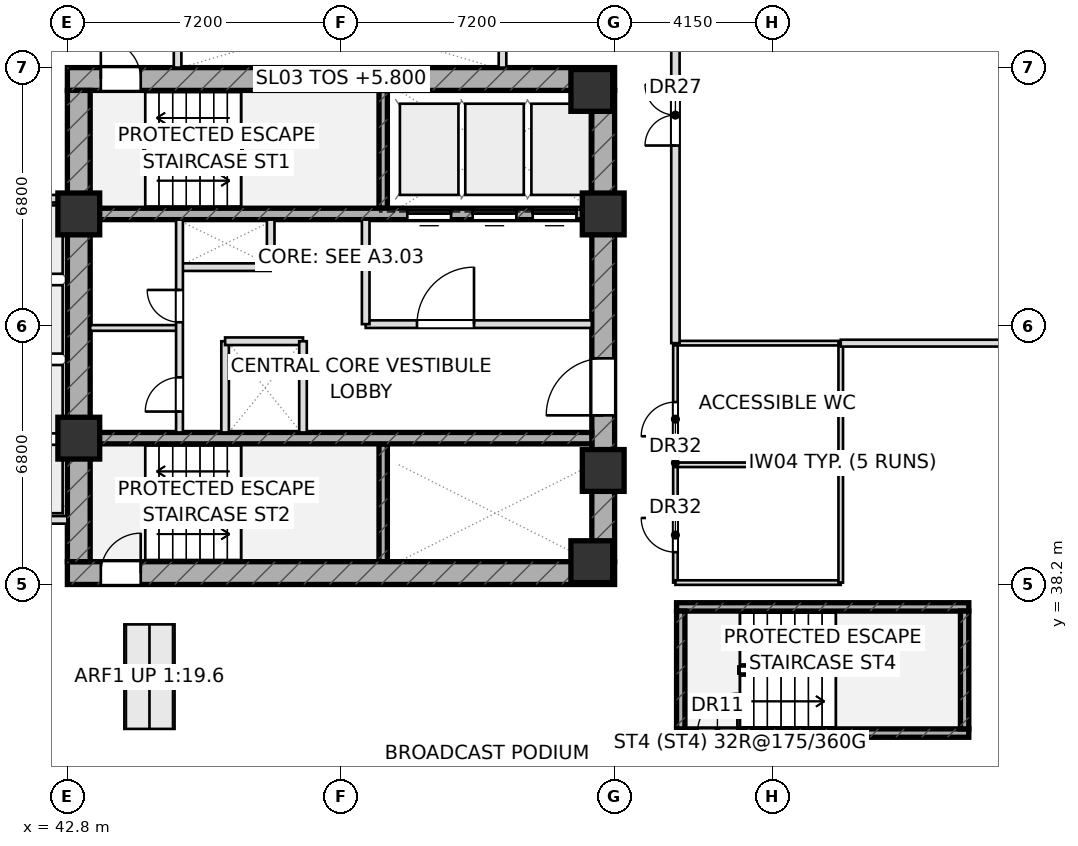
"""IFC4 building model, lengths in metres.
Left out: names, types, materials, properties, quantities, classifications, styles, units other than length and angle.
Written with IfcOpenShell. Run it as: python <this file> out.ifc"""

import sys

from ifc_helpers import new_model, si_unit, direction, frame, frame_2d, origin, origin_2d, place, context, subcontext, project, spatial, rectangle, extrude, element, fill, save


model = new_model("IFC4")
c1 = context("Model", 3, precision=1e-05, world=origin(), true_north=direction((0.0, 1.0)))
c2 = subcontext(c1, "Body", "Model", "MODEL_VIEW")
j1 = project(units=[si_unit("LENGTHUNIT", "METRE"), si_unit("PLANEANGLEUNIT", "RADIAN")], contexts=[c1])
p1 = place(None, origin())
s1 = spatial("IfcSite", under=j1, at=p1, CompositionType="ELEMENT")
p2 = place(p1, origin())
s2 = spatial("IfcBuilding", under=s1, at=p2, CompositionType="ELEMENT")
p3 = place(p2, frame((0.0, 0.0, 5.8)))
s3 = spatial("IfcBuildingStorey", under=s2, at=p3, CompositionType="ELEMENT", Elevation=5.8)
for number, where, z_axis, x_axis in (
    (1, (51.11, 48.1, 0.0), (0.0, 0.0, 1.0), (0.0, 1.0, 0.0)),
    (2, (51.11, 38.8, 0.0), (0.0, 0.0, 1.0), (0.0, 1.0, 0.0)),
):
    element("IfcWall", number, at=place(p3, frame(where, z_axis=z_axis, x_axis=x_axis)), inside=s3, PredefinedType="SHEAR", context=c2, shape_type="SweptSolid", body=[
        extrude(rectangle(XDim=3.1, YDim=0.22, at=frame_2d((1.55, 0.0))), origin(), (0.0, 0.0, 1.0), 5.25),
    ])
p4 = place(p3, frame((58.83, 34.29, 0.0), z_axis=(0.0, 0.0, 1.0), x_axis=(1.0, 0.0, 0.0)))
e3 = element("IfcWall", 3, at=p4, inside=s3, PredefinedType="SHEAR", context=c2, shape_type="SweptSolid", body=[
    extrude(rectangle(XDim=7.69, YDim=0.22, at=frame_2d((3.845, 0.0))), origin(), (0.0, 0.0, 1.0), 5.25),
])
p5 = place(p4, frame((0.55, 0.0, 0.0)))
e4 = element("IfcOpeningElement", 4, at=p5, cuts=e3, PredefinedType="OPENING", context=c2, shape_type="SweptSolid", body=[
    extrude(rectangle(XDim=1.05, YDim=2.2, at=frame_2d((0.525, 1.1))), frame((0.0, 0.12, 0.0), z_axis=(0.0, -1.0, 0.0), x_axis=(1.0, 0.0, 0.0)), (0.0, 0.0, 1.0), 0.24),
])
p6 = place(p3, frame((58.83, 37.61, 0.0), z_axis=(0.0, 0.0, 1.0), x_axis=(1.0, 0.0, 0.0)))
e5 = element("IfcWall", 5, at=p6, inside=s3, PredefinedType="SHEAR", context=c2, shape_type="SweptSolid", body=[
    extrude(rectangle(XDim=7.69, YDim=0.22, at=frame_2d((3.845, 0.0))), origin(), (0.0, 0.0, 1.0), 5.25),
])
for number, where, z_axis, x_axis in (
    (6, (66.41, 34.4, 0.0), (0.0, 0.0, 1.0), (0.0, 1.0, 0.0)),
    (7, (58.94, 34.4, 0.0), (0.0, 0.0, 1.0), (0.0, 1.0, 0.0)),
):
    element("IfcWall", number, at=place(p3, frame(where, z_axis=z_axis, x_axis=x_axis)), inside=s3, PredefinedType="SHEAR", context=c2, shape_type="SweptSolid", body=[
        extrude(rectangle(XDim=3.1, YDim=0.22, at=frame_2d((1.55, 0.0))), origin(), (0.0, 0.0, 1.0), 5.25),
    ])
p7 = place(p3, frame((42.8, 51.5, 0.0), z_axis=(0.0, 0.0, 1.0), x_axis=(1.0, 0.0, 0.0)))
e8 = element("IfcWall", 8, at=p7, inside=s3, PredefinedType="SHEAR", context=c2, shape_type="SweptSolid", body=[
    extrude(rectangle(XDim=14.4, YDim=0.6, at=frame_2d((7.2, 0.0))), origin(), (0.0, 0.0, 1.0), 5.25),
])
p8 = place(p7, frame((0.88, 0.0, 0.0)))
e9 = element("IfcOpeningElement", 9, at=p8, cuts=e8, PredefinedType="OPENING", context=c2, shape_type="SweptSolid", body=[
    extrude(rectangle(XDim=1.05, YDim=2.2, at=frame_2d((0.525, 1.1))), frame((0.0, 0.31, 0.0), z_axis=(0.0, -1.0, 0.0), x_axis=(1.0, 0.0, 0.0)), (0.0, 0.0, 1.0), 0.62),
])
p9 = place(p3, frame((42.8, 38.5, 0.0), z_axis=(0.0, 0.0, 1.0), x_axis=(1.0, 0.0, 0.0)))
e10 = element("IfcWall", 10, at=p9, inside=s3, PredefinedType="SHEAR", context=c2, shape_type="SweptSolid", body=[
    extrude(rectangle(XDim=14.4, YDim=0.6, at=frame_2d((7.2, 0.0))), origin(), (0.0, 0.0, 1.0), 5.25),
])
p10 = place(p9, frame((0.88, 0.0, 0.0)))
e11 = element("IfcOpeningElement", 11, at=p10, cuts=e10, PredefinedType="OPENING", context=c2, shape_type="SweptSolid", body=[
    extrude(rectangle(XDim=1.05, YDim=2.2, at=frame_2d((0.525, 1.1))), frame((0.0, 0.31, 0.0), z_axis=(0.0, -1.0, 0.0), x_axis=(1.0, 0.0, 0.0)), (0.0, 0.0, 1.0), 0.62),
])
p11 = place(p3, frame((43.1, 38.8, 0.0), z_axis=(0.0, 0.0, 1.0), x_axis=(0.0, 1.0, 0.0)))
e12 = element("IfcWall", 12, at=p11, inside=s3, PredefinedType="SHEAR", context=c2, shape_type="SweptSolid", body=[
    extrude(rectangle(XDim=12.4, YDim=0.6, at=frame_2d((6.2, 0.0))), origin(), (0.0, 0.0, 1.0), 5.25),
])
p12 = place(p3, frame((56.9, 38.8, 0.0), z_axis=(0.0, 0.0, 1.0), x_axis=(0.0, 1.0, 0.0)))
e13 = element("IfcWall", 13, at=p12, inside=s3, PredefinedType="SHEAR", context=c2, shape_type="SweptSolid", body=[
    extrude(rectangle(XDim=12.4, YDim=0.6, at=frame_2d((6.2, 0.0))), origin(), (0.0, 0.0, 1.0), 5.25),
])
p13 = place(p12, frame((3.85, 0.0, 0.0)))
e14 = element("IfcOpeningElement", 14, at=p13, cuts=e13, PredefinedType="OPENING", context=c2, shape_type="SweptSolid", body=[
    extrude(rectangle(XDim=1.5, YDim=2.2, at=frame_2d((0.75, 1.1))), frame((0.0, 0.31, 0.0), z_axis=(0.0, -1.0, 0.0), x_axis=(1.0, 0.0, 0.0)), (0.0, 0.0, 1.0), 0.62),
])
p14 = place(p3, frame((43.4, 47.95, 0.0), z_axis=(0.0, 0.0, 1.0), x_axis=(1.0, 0.0, 0.0)))
e15 = element("IfcWall", 15, at=p14, inside=s3, PredefinedType="SHEAR", context=c2, shape_type="SweptSolid", body=[
    extrude(rectangle(XDim=13.2, YDim=0.3, at=frame_2d((6.6, 0.0))), origin(), (0.0, 0.0, 1.0), 5.25),
])
p15 = place(p14, frame((8.345, 0.0, 0.0)))
e16 = element("IfcOpeningElement", 16, at=p15, cuts=e15, PredefinedType="OPENING", context=c2, shape_type="SweptSolid", body=[
    extrude(rectangle(XDim=1.15, YDim=2.2, at=frame_2d((0.575, 1.1))), frame((0.0, 0.16, 0.0), z_axis=(0.0, -1.0, 0.0), x_axis=(1.0, 0.0, 0.0)), (0.0, 0.0, 1.0), 0.32),
])
p16 = place(p14, frame((10.065, 0.0, 0.0)))
e17 = element("IfcOpeningElement", 17, at=p16, cuts=e15, PredefinedType="OPENING", context=c2, shape_type="SweptSolid", body=[
    extrude(rectangle(XDim=1.15, YDim=2.2, at=frame_2d((0.575, 1.1))), frame((0.0, 0.16, 0.0), z_axis=(0.0, -1.0, 0.0), x_axis=(1.0, 0.0, 0.0)), (0.0, 0.0, 1.0), 0.32),
])
p17 = place(p14, frame((11.645, 0.0, 0.0)))
e18 = element("IfcOpeningElement", 18, at=p17, cuts=e15, PredefinedType="OPENING", context=c2, shape_type="SweptSolid", body=[
    extrude(rectangle(XDim=1.15, YDim=2.2, at=frame_2d((0.575, 1.1))), frame((0.0, 0.16, 0.0), z_axis=(0.0, -1.0, 0.0), x_axis=(1.0, 0.0, 0.0)), (0.0, 0.0, 1.0), 0.32),
])
p18 = place(p3, frame((43.4, 42.05, 0.0), z_axis=(0.0, 0.0, 1.0), x_axis=(1.0, 0.0, 0.0)))
e19 = element("IfcWall", 19, at=p18, inside=s3, PredefinedType="SHEAR", context=c2, shape_type="SweptSolid", body=[
    extrude(rectangle(XDim=13.2, YDim=0.3, at=frame_2d((6.6, 0.0))), origin(), (0.0, 0.0, 1.0), 5.25),
])
for number, where, z_axis, x_axis in (
    (20, (43.1, 47.95, 0.0), (0.0, 0.0, 1.0), (1.0, 0.0, 0.0)),
    (21, (56.9, 47.95, 0.0), (0.0, 0.0, 1.0), (1.0, 0.0, 0.0)),
    (22, (56.6, 51.2, 0.0), (0.0, 0.0, 1.0), (1.0, 0.0, 0.0)),
    (23, (43.1, 42.05, 0.0), (0.0, 0.0, 1.0), (1.0, 0.0, 0.0)),
    (24, (56.9, 41.2, 0.0), (0.0, 0.0, 1.0), (1.0, 0.0, 0.0)),
    (25, (56.6, 38.8, 0.0), (0.0, 0.0, 1.0), (1.0, 0.0, 0.0)),
):
    element("IfcColumn", number, at=place(p3, frame(where, z_axis=z_axis, x_axis=x_axis)), inside=s3, PredefinedType="COLUMN", context=c2, shape_type="SweptSolid", body=[
        extrude(rectangle(XDim=1.1, YDim=1.1, at=origin_2d()), origin(), (0.0, 0.0, 1.0), 5.25),
    ])
for number, where, z_axis, x_axis in (
    (26, (40.3, 39.9, 0.0), (0.0, 0.0, 1.0), (1.0, 0.0, 0.0)),
    (27, (40.3, 48.35, 0.0), (0.0, 0.0, 1.0), (1.0, 0.0, 0.0)),
    (28, (45.7, 51.8, 0.0), (0.0, 0.0, 1.0), (0.0, 1.0, 0.0)),
    (29, (54.25, 51.8, 0.0), (0.0, 0.0, 1.0), (0.0, 1.0, 0.0)),
):
    element("IfcWall", number, at=place(p3, frame(where, z_axis=z_axis, x_axis=x_axis)), inside=s3, PredefinedType="PARTITIONING", context=c2, shape_type="SweptSolid", body=[
        extrude(rectangle(XDim=2.5, YDim=0.2, at=frame_2d((1.25, 0.0))), origin(), (0.0, 0.0, 1.0), 5.25),
    ])
p19 = place(p3, frame((45.75, 46.55, 0.0), z_axis=(0.0, 0.0, 1.0), x_axis=(1.0, 0.0, 0.0)))
e30 = element("IfcWall", 30, at=p19, inside=s3, PredefinedType="PARTITIONING", context=c2, shape_type="SweptSolid", body=[
    extrude(rectangle(XDim=2.4, YDim=0.2, at=frame_2d((1.2, 0.0))), origin(), (0.0, 0.0, 1.0), 5.25),
])
p20 = place(p3, frame((48.15, 46.55, 0.0), z_axis=(0.0, 0.0, 1.0), x_axis=(0.0, 1.0, 0.0)))
e31 = element("IfcWall", 31, at=p20, inside=s3, PredefinedType="PARTITIONING", context=c2, shape_type="SweptSolid", body=[
    extrude(rectangle(XDim=1.25, YDim=0.2, at=frame_2d((0.625, 0.0))), origin(), (0.0, 0.0, 1.0), 5.25),
])
p21 = place(p3, frame((46.95, 42.2, 0.0), z_axis=(0.0, 0.0, 1.0), x_axis=(0.0, 1.0, 0.0)))
e32 = element("IfcWall", 32, at=p21, inside=s3, PredefinedType="PARTITIONING", context=c2, shape_type="SweptSolid", body=[
    extrude(rectangle(XDim=2.4, YDim=0.2, at=frame_2d((1.2, 0.0))), origin(), (0.0, 0.0, 1.0), 5.25),
])
p22 = place(p3, frame((46.95, 44.6, 0.0), z_axis=(0.0, 0.0, 1.0), x_axis=(1.0, 0.0, 0.0)))
e33 = element("IfcWall", 33, at=p22, inside=s3, PredefinedType="PARTITIONING", context=c2, shape_type="SweptSolid", body=[
    extrude(rectangle(XDim=2.05, YDim=0.2, at=frame_2d((1.025, 0.0))), origin(), (0.0, 0.0, 1.0), 5.25),
])
p23 = place(p3, frame((50.65, 45.05, 0.0), z_axis=(0.0, 0.0, 1.0), x_axis=(1.0, 0.0, 0.0)))
e34 = element("IfcWall", 34, at=p23, inside=s3, PredefinedType="PARTITIONING", context=c2, shape_type="SweptSolid", body=[
    extrude(rectangle(XDim=5.95, YDim=0.2, at=frame_2d((2.975, 0.0))), origin(), (0.0, 0.0, 1.0), 5.25),
])
p24 = place(p23, frame((1.35, 0.0, 0.0)))
e35 = element("IfcOpeningElement", 35, at=p24, cuts=e34, PredefinedType="OPENING", context=c2, shape_type="SweptSolid", body=[
    extrude(rectangle(XDim=1.5, YDim=2.2, at=frame_2d((0.75, 1.1))), frame((0.0, 0.11, 0.0), z_axis=(0.0, -1.0, 0.0), x_axis=(1.0, 0.0, 0.0)), (0.0, 0.0, 1.0), 0.22),
])
p25 = place(p3, frame((50.65, 45.05, 0.0), z_axis=(0.0, 0.0, 1.0), x_axis=(0.0, 1.0, 0.0)))
e36 = element("IfcWall", 36, at=p25, inside=s3, PredefinedType="PARTITIONING", context=c2, shape_type="SweptSolid", body=[
    extrude(rectangle(XDim=2.75, YDim=0.2, at=frame_2d((1.375, 0.0))), origin(), (0.0, 0.0, 1.0), 5.25),
])
p26 = place(p3, frame((43.4, 44.95, 0.0), z_axis=(0.0, 0.0, 1.0), x_axis=(1.0, 0.0, 0.0)))
e37 = element("IfcWall", 37, at=p26, inside=s3, PredefinedType="PARTITIONING", context=c2, shape_type="SweptSolid", body=[
    extrude(rectangle(XDim=2.35, YDim=0.15, at=frame_2d((1.175, 0.0))), origin(), (0.0, 0.0, 1.0), 5.25),
])
p27 = place(p3, frame((45.75, 42.2, 0.0), z_axis=(0.0, 0.0, 1.0), x_axis=(0.0, 1.0, 0.0)))
e38 = element("IfcWall", 38, at=p27, inside=s3, PredefinedType="PARTITIONING", context=c2, shape_type="SweptSolid", body=[
    extrude(rectangle(XDim=5.6, YDim=0.18, at=frame_2d((2.8, 0.0))), origin(), (0.0, 0.0, 1.0), 5.25),
])
p28 = place(p27, frame((0.55, 0.0, 0.0)))
e39 = element("IfcOpeningElement", 39, at=p28, cuts=e38, PredefinedType="OPENING", context=c2, shape_type="SweptSolid", body=[
    extrude(rectangle(XDim=0.9, YDim=2.05, at=frame_2d((0.45, 1.025))), frame((0.0, 0.1, 0.0), z_axis=(0.0, -1.0, 0.0), x_axis=(1.0, 0.0, 0.0)), (0.0, 0.0, 1.0), 0.2),
])
p29 = place(p27, frame((2.9, 0.0, 0.0)))
e40 = element("IfcOpeningElement", 40, at=p29, cuts=e38, PredefinedType="OPENING", context=c2, shape_type="SweptSolid", body=[
    extrude(rectangle(XDim=0.85, YDim=2.05, at=frame_2d((0.425, 1.025))), frame((0.0, 0.1, 0.0), z_axis=(0.0, -1.0, 0.0), x_axis=(1.0, 0.0, 0.0)), (0.0, 0.0, 1.0), 0.2),
])
p30 = place(p3, frame((58.8, 38.25, 0.0), z_axis=(0.0, 0.0, 1.0), x_axis=(0.0, 1.0, 0.0)))
e41 = element("IfcWall", 41, at=p30, inside=s3, PredefinedType="PARTITIONING", context=c2, shape_type="SweptSolid", body=[
    extrude(rectangle(XDim=6.3, YDim=0.12, at=frame_2d((3.15, 0.0))), origin(), (0.0, 0.0, 1.0), 5.25),
])
p31 = place(p30, frame((0.8, 0.0, 0.0)))
e42 = element("IfcOpeningElement", 42, at=p31, cuts=e41, PredefinedType="OPENING", context=c2, shape_type="SweptSolid", body=[
    extrude(rectangle(XDim=0.9, YDim=2.05, at=frame_2d((0.45, 1.025))), frame((0.0, 0.07, 0.0), z_axis=(0.0, -1.0, 0.0), x_axis=(1.0, 0.0, 0.0)), (0.0, 0.0, 1.0), 0.14),
])
p32 = place(p30, frame((3.85, 0.0, 0.0)))
e43 = element("IfcOpeningElement", 43, at=p32, cuts=e41, PredefinedType="OPENING", context=c2, shape_type="SweptSolid", body=[
    extrude(rectangle(XDim=0.9, YDim=2.05, at=frame_2d((0.45, 1.025))), frame((0.0, 0.07, 0.0), z_axis=(0.0, -1.0, 0.0), x_axis=(1.0, 0.0, 0.0)), (0.0, 0.0, 1.0), 0.14),
])
for number, where, z_axis, x_axis in (
    (44, (58.8, 38.25, 0.0), (0.0, 0.0, 1.0), (1.0, 0.0, 0.0)),
    (45, (58.8, 41.35, 0.0), (0.0, 0.0, 1.0), (1.0, 0.0, 0.0)),
    (46, (58.8, 44.55, 0.0), (0.0, 0.0, 1.0), (1.0, 0.0, 0.0)),
):
    element("IfcWall", number, at=place(p3, frame(where, z_axis=z_axis, x_axis=x_axis)), inside=s3, PredefinedType="PARTITIONING", context=c2, shape_type="SweptSolid", body=[
        extrude(rectangle(XDim=4.35, YDim=0.12, at=frame_2d((2.175, 0.0))), origin(), (0.0, 0.0, 1.0), 5.25),
    ])
p33 = place(p3, frame((63.15, 38.25, 0.0), z_axis=(0.0, 0.0, 1.0), x_axis=(0.0, 1.0, 0.0)))
e47 = element("IfcWall", 47, at=p33, inside=s3, PredefinedType="PARTITIONING", context=c2, shape_type="SweptSolid", body=[
    extrude(rectangle(XDim=6.3, YDim=0.12, at=frame_2d((3.15, 0.0))), origin(), (0.0, 0.0, 1.0), 5.25),
])
p34 = place(p3, frame((58.8, 44.55, 0.0), z_axis=(0.0, 0.0, 1.0), x_axis=(0.0, 1.0, 0.0)))
e48 = element("IfcWall", 48, at=p34, inside=s3, PredefinedType="PARTITIONING", context=c2, shape_type="SweptSolid", body=[
    extrude(rectangle(XDim=11.55, YDim=0.22, at=frame_2d((5.775, 0.0))), origin(), (0.0, 0.0, 1.0), 4.325),
])
p35 = place(p34, frame((5.2, 0.0, 0.0)))
e49 = element("IfcOpeningElement", 49, at=p35, cuts=e48, PredefinedType="OPENING", context=c2, shape_type="SweptSolid", body=[
    extrude(rectangle(XDim=1.6, YDim=2.3, at=frame_2d((0.8, 1.15))), frame((0.0, 0.12, 0.0), z_axis=(0.0, -1.0, 0.0), x_axis=(1.0, 0.0, 0.0)), (0.0, 0.0, 1.0), 0.24),
])
p36 = place(p3, frame((63.15, 44.55, 0.0), z_axis=(0.0, 0.0, 1.0), x_axis=(1.0, 0.0, 0.0)))
e50 = element("IfcWall", 50, at=p36, inside=s3, PredefinedType="PARTITIONING", context=c2, shape_type="SweptSolid", body=[
    extrude(rectangle(XDim=20.949, YDim=0.18, at=frame_2d((10.474, 0.0))), origin(), (0.0, 0.0, 1.0), 5.25),
])
p37 = place(p3, frame((49.0, 42.2, 0.0), z_axis=(0.0, 0.0, 1.0), x_axis=(0.0, 1.0, 0.0)))
e51 = element("IfcWall", 51, at=p37, inside=s3, PredefinedType="PARTITIONING", context=c2, shape_type="SweptSolid", body=[
    extrude(rectangle(XDim=2.4, YDim=0.2, at=frame_2d((1.2, 0.0))), origin(), (0.0, 0.0, 1.0), 5.25),
])
p38 = place(p8, origin())
e52 = element("IfcDoor", 52, at=p38, inside=s3, OperationType="SINGLE_SWING_LEFT", PredefinedType="DOOR", context=c2, shape_type="SweptSolid", body=[
    extrude(rectangle(XDim=1.05, YDim=2.2, at=frame_2d((0.525, 1.1))), frame((0.0, 0.025, 0.0), z_axis=(0.0, -1.0, 0.0), x_axis=(1.0, 0.0, 0.0)), (0.0, 0.0, 1.0), 0.05),
])
fill(e9, e52)
p39 = place(p10, origin())
e53 = element("IfcDoor", 53, at=p39, inside=s3, OperationType="SINGLE_SWING_RIGHT", PredefinedType="DOOR", context=c2, shape_type="SweptSolid", body=[
    extrude(rectangle(XDim=1.05, YDim=2.2, at=frame_2d((0.525, 1.1))), frame((0.0, 0.025, 0.0), z_axis=(0.0, -1.0, 0.0), x_axis=(1.0, 0.0, 0.0)), (0.0, 0.0, 1.0), 0.05),
])
fill(e11, e53)
p40 = place(p13, origin())
e54 = element("IfcDoor", 54, at=p40, inside=s3, OperationType="SINGLE_SWING_LEFT", PredefinedType="DOOR", context=c2, shape_type="SweptSolid", body=[
    extrude(rectangle(XDim=1.5, YDim=2.2, at=frame_2d((0.75, 1.1))), frame((0.0, 0.025, 0.0), z_axis=(0.0, -1.0, 0.0), x_axis=(1.0, 0.0, 0.0)), (0.0, 0.0, 1.0), 0.05),
])
fill(e14, e54)
p41 = place(p24, origin())
e55 = element("IfcDoor", 55, at=p41, inside=s3, OperationType="SINGLE_SWING_RIGHT", PredefinedType="DOOR", context=c2, shape_type="SweptSolid", body=[
    extrude(rectangle(XDim=1.5, YDim=2.2, at=frame_2d((0.75, 1.1))), frame((0.0, 0.025, 0.0), z_axis=(0.0, -1.0, 0.0), x_axis=(1.0, 0.0, 0.0)), (0.0, 0.0, 1.0), 0.05),
])
fill(e35, e55)
p42 = place(p5, origin())
e56 = element("IfcDoor", 56, at=p42, inside=s3, OperationType="SINGLE_SWING_RIGHT", PredefinedType="DOOR", context=c2, shape_type="SweptSolid", body=[
    extrude(rectangle(XDim=1.05, YDim=2.2, at=frame_2d((0.525, 1.1))), frame((0.0, 0.025, 0.0), z_axis=(0.0, -1.0, 0.0), x_axis=(1.0, 0.0, 0.0)), (0.0, 0.0, 1.0), 0.05),
])
fill(e4, e56)
p43 = place(p28, origin())
e57 = element("IfcDoor", 57, at=p43, inside=s3, OperationType="SINGLE_SWING_LEFT", PredefinedType="DOOR", context=c2, shape_type="SweptSolid", body=[
    extrude(rectangle(XDim=0.9, YDim=2.05, at=frame_2d((0.45, 1.025))), frame((0.0, 0.025, 0.0), z_axis=(0.0, -1.0, 0.0), x_axis=(1.0, 0.0, 0.0)), (0.0, 0.0, 1.0), 0.05),
])
fill(e39, e57)
p44 = place(p29, origin())
e58 = element("IfcDoor", 58, at=p44, inside=s3, OperationType="SINGLE_SWING_RIGHT", PredefinedType="DOOR", context=c2, shape_type="SweptSolid", body=[
    extrude(rectangle(XDim=0.85, YDim=2.05, at=frame_2d((0.425, 1.025))), frame((0.0, 0.025, 0.0), z_axis=(0.0, -1.0, 0.0), x_axis=(1.0, 0.0, 0.0)), (0.0, 0.0, 1.0), 0.05),
])
fill(e40, e58)
p45 = place(p31, origin())
e59 = element("IfcDoor", 59, at=p45, inside=s3, OperationType="SINGLE_SWING_RIGHT", PredefinedType="DOOR", context=c2, shape_type="SweptSolid", body=[
    extrude(rectangle(XDim=0.9, YDim=2.05, at=frame_2d((0.45, 1.025))), frame((0.0, 0.025, 0.0), z_axis=(0.0, -1.0, 0.0), x_axis=(1.0, 0.0, 0.0)), (0.0, 0.0, 1.0), 0.05),
])
fill(e42, e59)
p46 = place(p32, origin())
e60 = element("IfcDoor", 60, at=p46, inside=s3, OperationType="SINGLE_SWING_LEFT", PredefinedType="DOOR", context=c2, shape_type="SweptSolid", body=[
    extrude(rectangle(XDim=0.9, YDim=2.05, at=frame_2d((0.45, 1.025))), frame((0.0, 0.025, 0.0), z_axis=(0.0, -1.0, 0.0), x_axis=(1.0, 0.0, 0.0)), (0.0, 0.0, 1.0), 0.05),
])
fill(e43, e60)
p47 = place(p35, origin())
e61 = element("IfcDoor", 61, at=p47, inside=s3, OperationType="DOUBLE_DOOR_SINGLE_SWING", PredefinedType="DOOR", context=c2, shape_type="SweptSolid", body=[
    extrude(rectangle(XDim=1.6, YDim=2.3, at=frame_2d((0.8, 1.15))), frame((0.0, 0.025, 0.0), z_axis=(0.0, -1.0, 0.0), x_axis=(1.0, 0.0, 0.0)), (0.0, 0.0, 1.0), 0.05),
])
fill(e49, e61)
p48 = place(p15, origin())
e62 = element("IfcDoor", 62, at=p48, inside=s3, OperationType="SLIDING_TO_LEFT", PredefinedType="DOOR", context=c2, shape_type="SweptSolid", body=[
    extrude(rectangle(XDim=1.15, YDim=2.2, at=frame_2d((0.575, 1.1))), frame((0.0, 0.025, 0.0), z_axis=(0.0, -1.0, 0.0), x_axis=(1.0, 0.0, 0.0)), (0.0, 0.0, 1.0), 0.05),
])
fill(e16, e62)
p49 = place(p16, origin())
e63 = element("IfcDoor", 63, at=p49, inside=s3, OperationType="SLIDING_TO_LEFT", PredefinedType="DOOR", context=c2, shape_type="SweptSolid", body=[
    extrude(rectangle(XDim=1.15, YDim=2.2, at=frame_2d((0.575, 1.1))), frame((0.0, 0.025, 0.0), z_axis=(0.0, -1.0, 0.0), x_axis=(1.0, 0.0, 0.0)), (0.0, 0.0, 1.0), 0.05),
])
fill(e17, e63)
p50 = place(p17, origin())
e64 = element("IfcDoor", 64, at=p50, inside=s3, OperationType="SLIDING_TO_LEFT", PredefinedType="DOOR", context=c2, shape_type="SweptSolid", body=[
    extrude(rectangle(XDim=1.15, YDim=2.2, at=frame_2d((0.575, 1.1))), frame((0.0, 0.025, 0.0), z_axis=(0.0, -1.0, 0.0), x_axis=(1.0, 0.0, 0.0)), (0.0, 0.0, 1.0), 0.05),
])
fill(e18, e64)
save(model, sys.argv[1])
